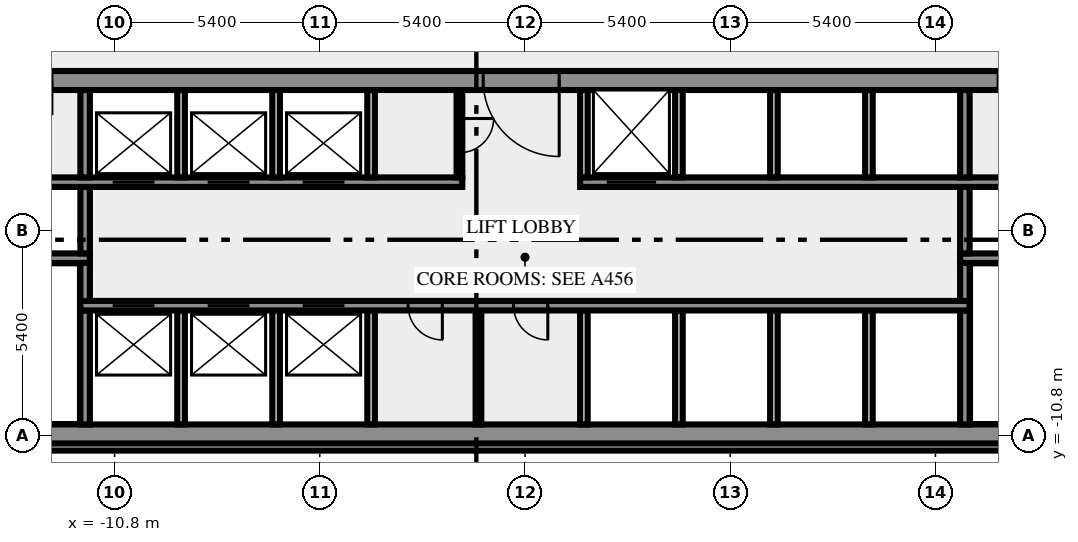
"""IFC4 building model, lengths in metres.
Left out: names, types, materials, properties, quantities, classifications, styles, units other than length and angle.
Written with IfcOpenShell. Run it as: python <this file> out.ifc"""

import sys

from ifc_helpers import new_model, si_unit, direction, frame, frame_2d, origin, place, context, subcontext, project, spatial, rectangle, extrude, element, fill, save


model = new_model("IFC4")
c1 = context("Model", 3, precision=1e-05, world=origin(), true_north=direction((0.0, 1.0)))
c2 = subcontext(c1, "Body", "Model", "MODEL_VIEW")
j1 = project(units=[si_unit("LENGTHUNIT", "METRE"), si_unit("PLANEANGLEUNIT", "RADIAN")], contexts=[c1])
p1 = place(None, origin())
s1 = spatial("IfcSite", under=j1, at=p1, CompositionType="ELEMENT")
p2 = place(p1, origin())
s2 = spatial("IfcBuilding", under=s1, at=p2, CompositionType="ELEMENT")
p3 = place(p2, frame((0.0, 0.0, 51.0)))
s3 = spatial("IfcBuildingStorey", under=s2, at=p3, CompositionType="ELEMENT", Elevation=51.0)
p4 = place(p3, frame((-17.444, -11.088, 0.0), z_axis=(0.0, 0.0, 1.0), x_axis=(1.0, 0.0, 0.0)))
e1 = element("IfcWall", 1, at=p4, inside=s3, PredefinedType="SOLIDWALL", context=c2, shape_type="SweptSolid", body=[
    extrude(rectangle(XDim=34.888, YDim=0.2, at=frame_2d((17.444, 0.0))), origin(), (0.0, 0.0, 1.0), 3.65),
])
p5 = place(p3, frame((-20.0, -10.75, 0.0), z_axis=(0.0, 0.0, 1.0), x_axis=(1.0, 0.0, 0.0)))
e2 = element("IfcWall", 2, at=p5, inside=s3, PredefinedType="SHEAR", context=c2, shape_type="SweptSolid", body=[
    extrude(rectangle(XDim=40.0, YDim=0.5, at=frame_2d((20.0, 0.0))), origin(), (0.0, 0.0, 1.0), 3.65),
])
p6 = place(p5, frame((0.8, 0.0, 1.0)))
e3 = element("IfcOpeningElement", 3, at=p6, cuts=e2, PredefinedType="OPENING", context=c2, shape_type="SweptSolid", body=[
    extrude(rectangle(XDim=1.2, YDim=1.2, at=frame_2d((0.6, 0.6))), frame((0.0, 0.26, 0.0), z_axis=(0.0, -1.0, 0.0), x_axis=(1.0, 0.0, 0.0)), (0.0, 0.0, 1.0), 0.52),
])
p7 = place(p5, frame((38.0, 0.0, 1.0)))
e4 = element("IfcOpeningElement", 4, at=p7, cuts=e2, PredefinedType="OPENING", context=c2, shape_type="SweptSolid", body=[
    extrude(rectangle(XDim=1.2, YDim=1.2, at=frame_2d((0.6, 0.6))), frame((0.0, 0.26, 0.0), z_axis=(0.0, -1.0, 0.0), x_axis=(1.0, 0.0, 0.0)), (0.0, 0.0, 1.0), 0.52),
])
p8 = place(p3, frame((-11.575, -10.5, 0.0), z_axis=(0.0, 0.0, 1.0), x_axis=(0.0, 1.0, 0.0)))
e5 = element("IfcWall", 5, at=p8, inside=s3, PredefinedType="SHEAR", context=c2, shape_type="SweptSolid", body=[
    extrude(rectangle(XDim=3.0, YDim=0.25, at=frame_2d((1.5, 0.0))), origin(), (0.0, 0.0, 1.0), 3.65),
])
for number, where, z_axis, x_axis in (
    (6, (-9.05, -10.5, 0.0), (0.0, 0.0, 1.0), (0.0, 1.0, 0.0)),
    (7, (-6.55, -10.5, 0.0), (0.0, 0.0, 1.0), (0.0, 1.0, 0.0)),
    (8, (-4.05, -10.5, 0.0), (0.0, 0.0, 1.0), (0.0, 1.0, 0.0)),
):
    element("IfcWall", number, at=place(p3, frame(where, z_axis=z_axis, x_axis=x_axis)), inside=s3, PredefinedType="SOLIDWALL", context=c2, shape_type="SweptSolid", body=[
        extrude(rectangle(XDim=3.0, YDim=0.2, at=frame_2d((1.5, 0.0))), origin(), (0.0, 0.0, 1.0), 3.65),
    ])
p9 = place(p3, frame((-1.225, -10.5, 0.0), z_axis=(0.0, 0.0, 1.0), x_axis=(0.0, 1.0, 0.0)))
e9 = element("IfcWall", 9, at=p9, inside=s3, PredefinedType="PARTITIONING", context=c2, shape_type="SweptSolid", body=[
    extrude(rectangle(XDim=3.0, YDim=0.15, at=frame_2d((1.5, 0.0))), origin(), (0.0, 0.0, 1.0), 3.65),
])
for number, where, z_axis, x_axis in (
    (10, (1.55, -10.5, 0.0), (0.0, 0.0, 1.0), (0.0, 1.0, 0.0)),
    (11, (4.05, -10.5, 0.0), (0.0, 0.0, 1.0), (0.0, 1.0, 0.0)),
    (12, (6.55, -10.5, 0.0), (0.0, 0.0, 1.0), (0.0, 1.0, 0.0)),
    (13, (9.05, -10.5, 0.0), (0.0, 0.0, 1.0), (0.0, 1.0, 0.0)),
):
    element("IfcWall", number, at=place(p3, frame(where, z_axis=z_axis, x_axis=x_axis)), inside=s3, PredefinedType="SOLIDWALL", context=c2, shape_type="SweptSolid", body=[
        extrude(rectangle(XDim=3.0, YDim=0.2, at=frame_2d((1.5, 0.0))), origin(), (0.0, 0.0, 1.0), 3.65),
    ])
p10 = place(p3, frame((11.575, -10.5, 0.0), z_axis=(0.0, 0.0, 1.0), x_axis=(0.0, 1.0, 0.0)))
e14 = element("IfcWall", 14, at=p10, inside=s3, PredefinedType="SHEAR", context=c2, shape_type="SweptSolid", body=[
    extrude(rectangle(XDim=3.0, YDim=0.25, at=frame_2d((1.5, 0.0))), origin(), (0.0, 0.0, 1.0), 3.65),
])
p11 = place(p3, frame((11.7, -7.375, 0.0), z_axis=(0.0, 0.0, 1.0), x_axis=(-1.0, 0.0, 0.0)))
e15 = element("IfcWall", 15, at=p11, inside=s3, PredefinedType="SHEAR", context=c2, shape_type="SweptSolid", body=[
    extrude(rectangle(XDim=23.4, YDim=0.25, at=frame_2d((11.7, 0.0))), origin(), (0.0, 0.0, 1.0), 3.65),
])
p12 = place(p11, frame((21.45, 0.0, 0.0)))
e16 = element("IfcOpeningElement", 16, at=p12, cuts=e15, PredefinedType="OPENING", context=c2, shape_type="SweptSolid", body=[
    extrude(rectangle(XDim=1.1, YDim=2.1, at=frame_2d((0.55, 1.05))), frame((0.0, 0.135, 0.0), z_axis=(0.0, -1.0, 0.0), x_axis=(1.0, 0.0, 0.0)), (0.0, 0.0, 1.0), 0.27),
])
p13 = place(p11, frame((18.95, 0.0, 0.0)))
e17 = element("IfcOpeningElement", 17, at=p13, cuts=e15, PredefinedType="OPENING", context=c2, shape_type="SweptSolid", body=[
    extrude(rectangle(XDim=1.1, YDim=2.1, at=frame_2d((0.55, 1.05))), frame((0.0, 0.135, 0.0), z_axis=(0.0, -1.0, 0.0), x_axis=(1.0, 0.0, 0.0)), (0.0, 0.0, 1.0), 0.27),
])
p14 = place(p11, frame((16.45, 0.0, 0.0)))
e18 = element("IfcOpeningElement", 18, at=p14, cuts=e15, PredefinedType="OPENING", context=c2, shape_type="SweptSolid", body=[
    extrude(rectangle(XDim=1.1, YDim=2.1, at=frame_2d((0.55, 1.05))), frame((0.0, 0.135, 0.0), z_axis=(0.0, -1.0, 0.0), x_axis=(1.0, 0.0, 0.0)), (0.0, 0.0, 1.0), 0.27),
])
p15 = place(p11, frame((13.875, 0.0, 0.0)))
e19 = element("IfcOpeningElement", 19, at=p15, cuts=e15, PredefinedType="OPENING", context=c2, shape_type="SweptSolid", body=[
    extrude(rectangle(XDim=0.9, YDim=2.1, at=frame_2d((0.45, 1.05))), frame((0.0, 0.135, 0.0), z_axis=(0.0, -1.0, 0.0), x_axis=(1.0, 0.0, 0.0)), (0.0, 0.0, 1.0), 0.27),
])
p16 = place(p11, frame((11.1, 0.0, 0.0)))
e20 = element("IfcOpeningElement", 20, at=p16, cuts=e15, PredefinedType="OPENING", context=c2, shape_type="SweptSolid", body=[
    extrude(rectangle(XDim=0.9, YDim=2.1, at=frame_2d((0.45, 1.05))), frame((0.0, 0.135, 0.0), z_axis=(0.0, -1.0, 0.0), x_axis=(1.0, 0.0, 0.0)), (0.0, 0.0, 1.0), 0.27),
])
for number, where, z_axis, x_axis in (
    (21, (-11.575, -7.25, 0.0), (0.0, 0.0, 1.0), (0.0, 1.0, 0.0)),
    (22, (11.575, -7.25, 0.0), (0.0, 0.0, 1.0), (0.0, 1.0, 0.0)),
):
    element("IfcWall", number, at=place(p3, frame(where, z_axis=z_axis, x_axis=x_axis)), inside=s3, PredefinedType="SHEAR", context=c2, shape_type="SweptSolid", body=[
        extrude(rectangle(XDim=1.0, YDim=0.25, at=frame_2d((0.5, 0.0))), origin(), (0.0, 0.0, 1.0), 3.65),
    ])
p17 = place(p3, frame((-11.45, -6.125, 0.0), z_axis=(0.0, 0.0, 1.0), x_axis=(-1.0, 0.0, 0.0)))
e23 = element("IfcWall", 23, at=p17, inside=s3, PredefinedType="SHEAR", context=c2, shape_type="SweptSolid", body=[
    extrude(rectangle(XDim=8.05, YDim=0.25, at=frame_2d((4.025, 0.0))), origin(), (0.0, 0.0, 1.0), 3.65),
])
p18 = place(p17, frame((6.2, 0.0, 0.0)))
e24 = element("IfcOpeningElement", 24, at=p18, cuts=e23, PredefinedType="OPENING", context=c2, shape_type="SweptSolid", body=[
    extrude(rectangle(XDim=1.8, YDim=2.1, at=frame_2d((0.9, 1.05))), frame((0.0, 0.135, 0.0), z_axis=(0.0, -1.0, 0.0), x_axis=(1.0, 0.0, 0.0)), (0.0, 0.0, 1.0), 0.27),
])
p19 = place(p3, frame((19.5, -6.125, 0.0), z_axis=(0.0, 0.0, 1.0), x_axis=(-1.0, 0.0, 0.0)))
e25 = element("IfcWall", 25, at=p19, inside=s3, PredefinedType="SHEAR", context=c2, shape_type="SweptSolid", body=[
    extrude(rectangle(XDim=8.05, YDim=0.25, at=frame_2d((4.025, 0.0))), origin(), (0.0, 0.0, 1.0), 3.65),
])
p20 = place(p19, frame((0.05, 0.0, 0.0)))
e26 = element("IfcOpeningElement", 26, at=p20, cuts=e25, PredefinedType="OPENING", context=c2, shape_type="SweptSolid", body=[
    extrude(rectangle(XDim=1.8, YDim=2.1, at=frame_2d((0.9, 1.05))), frame((0.0, 0.135, 0.0), z_axis=(0.0, -1.0, 0.0), x_axis=(1.0, 0.0, 0.0)), (0.0, 0.0, 1.0), 0.27),
])
for number, where, z_axis, x_axis in (
    (27, (-11.575, -6.0, 0.0), (0.0, 0.0, 1.0), (0.0, 1.0, 0.0)),
    (28, (11.575, -6.0, 0.0), (0.0, 0.0, 1.0), (0.0, 1.0, 0.0)),
):
    element("IfcWall", number, at=place(p3, frame(where, z_axis=z_axis, x_axis=x_axis)), inside=s3, PredefinedType="SHEAR", context=c2, shape_type="SweptSolid", body=[
        extrude(rectangle(XDim=1.75, YDim=0.25, at=frame_2d((0.875, 0.0))), origin(), (0.0, 0.0, 1.0), 3.65),
    ])
p21 = place(p3, frame((-14.35, -4.125, 0.0), z_axis=(0.0, 0.0, 1.0), x_axis=(1.0, 0.0, 0.0)))
e29 = element("IfcWall", 29, at=p21, inside=s3, PredefinedType="SHEAR", context=c2, shape_type="SweptSolid", body=[
    extrude(rectangle(XDim=12.7, YDim=0.25, at=frame_2d((6.35, 0.0))), origin(), (0.0, 0.0, 1.0), 3.65),
])
p22 = place(p21, frame((3.5, 0.0, 0.0)))
e30 = element("IfcOpeningElement", 30, at=p22, cuts=e29, PredefinedType="OPENING", context=c2, shape_type="SweptSolid", body=[
    extrude(rectangle(XDim=1.1, YDim=2.1, at=frame_2d((0.55, 1.05))), frame((0.0, 0.135, 0.0), z_axis=(0.0, -1.0, 0.0), x_axis=(1.0, 0.0, 0.0)), (0.0, 0.0, 1.0), 0.27),
])
p23 = place(p21, frame((6.0, 0.0, 0.0)))
e31 = element("IfcOpeningElement", 31, at=p23, cuts=e29, PredefinedType="OPENING", context=c2, shape_type="SweptSolid", body=[
    extrude(rectangle(XDim=1.1, YDim=2.1, at=frame_2d((0.55, 1.05))), frame((0.0, 0.135, 0.0), z_axis=(0.0, -1.0, 0.0), x_axis=(1.0, 0.0, 0.0)), (0.0, 0.0, 1.0), 0.27),
])
p24 = place(p21, frame((8.5, 0.0, 0.0)))
e32 = element("IfcOpeningElement", 32, at=p24, cuts=e29, PredefinedType="OPENING", context=c2, shape_type="SweptSolid", body=[
    extrude(rectangle(XDim=1.1, YDim=2.1, at=frame_2d((0.55, 1.05))), frame((0.0, 0.135, 0.0), z_axis=(0.0, -1.0, 0.0), x_axis=(1.0, 0.0, 0.0)), (0.0, 0.0, 1.0), 0.27),
])
p25 = place(p3, frame((1.45, -4.125, 0.0), z_axis=(0.0, 0.0, 1.0), x_axis=(1.0, 0.0, 0.0)))
e33 = element("IfcWall", 33, at=p25, inside=s3, PredefinedType="SHEAR", context=c2, shape_type="SweptSolid", body=[
    extrude(rectangle(XDim=12.9, YDim=0.25, at=frame_2d((6.45, 0.0))), origin(), (0.0, 0.0, 1.0), 3.65),
])
p26 = place(p25, frame((0.7, 0.0, 0.0)))
e34 = element("IfcOpeningElement", 34, at=p26, cuts=e33, PredefinedType="OPENING", context=c2, shape_type="SweptSolid", body=[
    extrude(rectangle(XDim=1.3, YDim=2.1, at=frame_2d((0.65, 1.05))), frame((0.0, 0.135, 0.0), z_axis=(0.0, -1.0, 0.0), x_axis=(1.0, 0.0, 0.0)), (0.0, 0.0, 1.0), 0.27),
])
p27 = place(p3, frame((-11.575, -4.0, 0.0), z_axis=(0.0, 0.0, 1.0), x_axis=(0.0, 1.0, 0.0)))
e35 = element("IfcWall", 35, at=p27, inside=s3, PredefinedType="SHEAR", context=c2, shape_type="SweptSolid", body=[
    extrude(rectangle(XDim=2.3, YDim=0.25, at=frame_2d((1.15, 0.0))), origin(), (0.0, 0.0, 1.0), 3.65),
])
for number, where, z_axis, x_axis in (
    (36, (-9.05, -4.0, 0.0), (0.0, 0.0, 1.0), (0.0, 1.0, 0.0)),
    (37, (-6.55, -4.0, 0.0), (0.0, 0.0, 1.0), (0.0, 1.0, 0.0)),
    (38, (-4.05, -4.0, 0.0), (0.0, 0.0, 1.0), (0.0, 1.0, 0.0)),
):
    element("IfcWall", number, at=place(p3, frame(where, z_axis=z_axis, x_axis=x_axis)), inside=s3, PredefinedType="SOLIDWALL", context=c2, shape_type="SweptSolid", body=[
        extrude(rectangle(XDim=2.3, YDim=0.2, at=frame_2d((1.15, 0.0))), origin(), (0.0, 0.0, 1.0), 3.65),
    ])
p28 = place(p3, frame((-1.725, -1.7, 0.0), z_axis=(0.0, 0.0, 1.0), x_axis=(0.0, -1.0, 0.0)))
e39 = element("IfcWall", 39, at=p28, inside=s3, PredefinedType="PARTITIONING", context=c2, shape_type="SweptSolid", body=[
    extrude(rectangle(XDim=2.3, YDim=0.15, at=frame_2d((1.15, 0.0))), origin(), (0.0, 0.0, 1.0), 3.65),
])
p29 = place(p28, frame((0.75, 0.0, 0.0)))
e40 = element("IfcOpeningElement", 40, at=p29, cuts=e39, PredefinedType="OPENING", context=c2, shape_type="SweptSolid", body=[
    extrude(rectangle(XDim=0.9, YDim=2.1, at=frame_2d((0.45, 1.05))), frame((0.0, 0.085, 0.0), z_axis=(0.0, -1.0, 0.0), x_axis=(1.0, 0.0, 0.0)), (0.0, 0.0, 1.0), 0.17),
])
for number, where, z_axis, x_axis in (
    (41, (1.55, -4.0, 0.0), (0.0, 0.0, 1.0), (0.0, 1.0, 0.0)),
    (42, (4.05, -4.0, 0.0), (0.0, 0.0, 1.0), (0.0, 1.0, 0.0)),
    (43, (6.55, -4.0, 0.0), (0.0, 0.0, 1.0), (0.0, 1.0, 0.0)),
    (44, (9.05, -4.0, 0.0), (0.0, 0.0, 1.0), (0.0, 1.0, 0.0)),
):
    element("IfcWall", number, at=place(p3, frame(where, z_axis=z_axis, x_axis=x_axis)), inside=s3, PredefinedType="SOLIDWALL", context=c2, shape_type="SweptSolid", body=[
        extrude(rectangle(XDim=2.3, YDim=0.2, at=frame_2d((1.15, 0.0))), origin(), (0.0, 0.0, 1.0), 3.65),
    ])
p30 = place(p3, frame((11.575, -4.0, 0.0), z_axis=(0.0, 0.0, 1.0), x_axis=(0.0, 1.0, 0.0)))
e45 = element("IfcWall", 45, at=p30, inside=s3, PredefinedType="SHEAR", context=c2, shape_type="SweptSolid", body=[
    extrude(rectangle(XDim=2.3, YDim=0.25, at=frame_2d((1.15, 0.0))), origin(), (0.0, 0.0, 1.0), 3.65),
])
p31 = place(p3, frame((20.49, -1.45, 0.0), z_axis=(0.0, 0.0, 1.0), x_axis=(-1.0, 0.0, 0.0)))
e46 = element("IfcWall", 46, at=p31, inside=s3, PredefinedType="SHEAR", context=c2, shape_type="SweptSolid", body=[
    extrude(rectangle(XDim=40.98, YDim=0.5, at=frame_2d((20.49, 0.0))), origin(), (0.0, 0.0, 1.0), 3.65),
])
p32 = place(p31, frame((38.14, 0.0, 0.0)))
e47 = element("IfcOpeningElement", 47, at=p32, cuts=e46, PredefinedType="OPENING", context=c2, shape_type="SweptSolid", body=[
    extrude(rectangle(XDim=1.8, YDim=2.1, at=frame_2d((0.9, 1.05))), frame((0.0, 0.26, 0.0), z_axis=(0.0, -1.0, 0.0), x_axis=(1.0, 0.0, 0.0)), (0.0, 0.0, 1.0), 0.52),
])
p33 = place(p31, frame((35.89, 0.0, 0.0)))
e48 = element("IfcOpeningElement", 48, at=p33, cuts=e46, PredefinedType="OPENING", context=c2, shape_type="SweptSolid", body=[
    extrude(rectangle(XDim=0.9, YDim=2.1, at=frame_2d((0.45, 1.05))), frame((0.0, 0.26, 0.0), z_axis=(0.0, -1.0, 0.0), x_axis=(1.0, 0.0, 0.0)), (0.0, 0.0, 1.0), 0.52),
])
p34 = place(p31, frame((32.94, 0.0, 0.0)))
e49 = element("IfcOpeningElement", 49, at=p34, cuts=e46, PredefinedType="OPENING", context=c2, shape_type="SweptSolid", body=[
    extrude(rectangle(XDim=0.9, YDim=2.1, at=frame_2d((0.45, 1.05))), frame((0.0, 0.26, 0.0), z_axis=(0.0, -1.0, 0.0), x_axis=(1.0, 0.0, 0.0)), (0.0, 0.0, 1.0), 0.52),
])
p35 = place(p31, frame((19.59, 0.0, 0.0)))
e50 = element("IfcOpeningElement", 50, at=p35, cuts=e46, PredefinedType="OPENING", context=c2, shape_type="SweptSolid", body=[
    extrude(rectangle(XDim=2.0, YDim=2.1, at=frame_2d((1.0, 1.05))), frame((0.0, 0.26, 0.0), z_axis=(0.0, -1.0, 0.0), x_axis=(1.0, 0.0, 0.0)), (0.0, 0.0, 1.0), 0.52),
])
p36 = place(p31, frame((7.14, 0.0, 0.0)))
e51 = element("IfcOpeningElement", 51, at=p36, cuts=e46, PredefinedType="OPENING", context=c2, shape_type="SweptSolid", body=[
    extrude(rectangle(XDim=0.9, YDim=2.1, at=frame_2d((0.45, 1.05))), frame((0.0, 0.26, 0.0), z_axis=(0.0, -1.0, 0.0), x_axis=(1.0, 0.0, 0.0)), (0.0, 0.0, 1.0), 0.52),
])
p37 = place(p31, frame((5.028, 0.0, 0.0)))
e52 = element("IfcOpeningElement", 52, at=p37, cuts=e46, PredefinedType="OPENING", context=c2, shape_type="SweptSolid", body=[
    extrude(rectangle(XDim=0.8, YDim=2.1, at=frame_2d((0.4, 1.05))), frame((0.0, 0.26, 0.0), z_axis=(0.0, -1.0, 0.0), x_axis=(1.0, 0.0, 0.0)), (0.0, 0.0, 1.0), 0.52),
])
p38 = place(p31, frame((3.452, 0.0, 0.0)))
e53 = element("IfcOpeningElement", 53, at=p38, cuts=e46, PredefinedType="OPENING", context=c2, shape_type="SweptSolid", body=[
    extrude(rectangle(XDim=0.8, YDim=2.1, at=frame_2d((0.4, 1.05))), frame((0.0, 0.26, 0.0), z_axis=(0.0, -1.0, 0.0), x_axis=(1.0, 0.0, 0.0)), (0.0, 0.0, 1.0), 0.52),
])
p39 = place(p31, frame((1.04, 0.0, 0.0)))
e54 = element("IfcOpeningElement", 54, at=p39, cuts=e46, PredefinedType="OPENING", context=c2, shape_type="SweptSolid", body=[
    extrude(rectangle(XDim=1.8, YDim=2.1, at=frame_2d((0.9, 1.05))), frame((0.0, 0.26, 0.0), z_axis=(0.0, -1.0, 0.0), x_axis=(1.0, 0.0, 0.0)), (0.0, 0.0, 1.0), 0.52),
])
p40 = place(p12, origin())
e55 = element("IfcDoor", 55, at=p40, inside=s3, OperationType="DOUBLE_DOOR_SLIDING", PredefinedType="DOOR", context=c2, shape_type="SweptSolid", body=[
    extrude(rectangle(XDim=1.1, YDim=2.1, at=frame_2d((0.55, 1.05))), frame((0.0, 0.025, 0.0), z_axis=(0.0, -1.0, 0.0), x_axis=(1.0, 0.0, 0.0)), (0.0, 0.0, 1.0), 0.05),
])
fill(e16, e55)
p41 = place(p13, origin())
e56 = element("IfcDoor", 56, at=p41, inside=s3, OperationType="DOUBLE_DOOR_SLIDING", PredefinedType="DOOR", context=c2, shape_type="SweptSolid", body=[
    extrude(rectangle(XDim=1.1, YDim=2.1, at=frame_2d((0.55, 1.05))), frame((0.0, 0.025, 0.0), z_axis=(0.0, -1.0, 0.0), x_axis=(1.0, 0.0, 0.0)), (0.0, 0.0, 1.0), 0.05),
])
fill(e17, e56)
p42 = place(p14, origin())
e57 = element("IfcDoor", 57, at=p42, inside=s3, OperationType="DOUBLE_DOOR_SLIDING", PredefinedType="DOOR", context=c2, shape_type="SweptSolid", body=[
    extrude(rectangle(XDim=1.1, YDim=2.1, at=frame_2d((0.55, 1.05))), frame((0.0, 0.025, 0.0), z_axis=(0.0, -1.0, 0.0), x_axis=(1.0, 0.0, 0.0)), (0.0, 0.0, 1.0), 0.05),
])
fill(e18, e57)
p43 = place(p15, origin())
e58 = element("IfcDoor", 58, at=p43, inside=s3, OperationType="SINGLE_SWING_RIGHT", PredefinedType="DOOR", context=c2, shape_type="SweptSolid", body=[
    extrude(rectangle(XDim=0.9, YDim=2.1, at=frame_2d((0.45, 1.05))), frame((0.0, 0.025, 0.0), z_axis=(0.0, -1.0, 0.0), x_axis=(1.0, 0.0, 0.0)), (0.0, 0.0, 1.0), 0.05),
])
fill(e19, e58)
p44 = place(p16, origin())
e59 = element("IfcDoor", 59, at=p44, inside=s3, OperationType="SINGLE_SWING_LEFT", PredefinedType="DOOR", context=c2, shape_type="SweptSolid", body=[
    extrude(rectangle(XDim=0.9, YDim=2.1, at=frame_2d((0.45, 1.05))), frame((0.0, 0.025, 0.0), z_axis=(0.0, -1.0, 0.0), x_axis=(1.0, 0.0, 0.0)), (0.0, 0.0, 1.0), 0.05),
])
fill(e20, e59)
p45 = place(p22, origin())
e60 = element("IfcDoor", 60, at=p45, inside=s3, OperationType="DOUBLE_DOOR_SLIDING", PredefinedType="DOOR", context=c2, shape_type="SweptSolid", body=[
    extrude(rectangle(XDim=1.1, YDim=2.1, at=frame_2d((0.55, 1.05))), frame((0.0, 0.025, 0.0), z_axis=(0.0, -1.0, 0.0), x_axis=(1.0, 0.0, 0.0)), (0.0, 0.0, 1.0), 0.05),
])
fill(e30, e60)
p46 = place(p23, origin())
e61 = element("IfcDoor", 61, at=p46, inside=s3, OperationType="DOUBLE_DOOR_SLIDING", PredefinedType="DOOR", context=c2, shape_type="SweptSolid", body=[
    extrude(rectangle(XDim=1.1, YDim=2.1, at=frame_2d((0.55, 1.05))), frame((0.0, 0.025, 0.0), z_axis=(0.0, -1.0, 0.0), x_axis=(1.0, 0.0, 0.0)), (0.0, 0.0, 1.0), 0.05),
])
fill(e31, e61)
p47 = place(p24, origin())
e62 = element("IfcDoor", 62, at=p47, inside=s3, OperationType="DOUBLE_DOOR_SLIDING", PredefinedType="DOOR", context=c2, shape_type="SweptSolid", body=[
    extrude(rectangle(XDim=1.1, YDim=2.1, at=frame_2d((0.55, 1.05))), frame((0.0, 0.025, 0.0), z_axis=(0.0, -1.0, 0.0), x_axis=(1.0, 0.0, 0.0)), (0.0, 0.0, 1.0), 0.05),
])
fill(e32, e62)
p48 = place(p26, origin())
e63 = element("IfcDoor", 63, at=p48, inside=s3, OperationType="DOUBLE_DOOR_SLIDING", PredefinedType="DOOR", context=c2, shape_type="SweptSolid", body=[
    extrude(rectangle(XDim=1.3, YDim=2.1, at=frame_2d((0.65, 1.05))), frame((0.0, 0.025, 0.0), z_axis=(0.0, -1.0, 0.0), x_axis=(1.0, 0.0, 0.0)), (0.0, 0.0, 1.0), 0.05),
])
fill(e34, e63)
p49 = place(p29, origin())
e64 = element("IfcDoor", 64, at=p49, inside=s3, OperationType="SINGLE_SWING_RIGHT", PredefinedType="DOOR", context=c2, shape_type="SweptSolid", body=[
    extrude(rectangle(XDim=0.9, YDim=2.1, at=frame_2d((0.45, 1.05))), frame((0.0, 0.025, 0.0), z_axis=(0.0, -1.0, 0.0), x_axis=(1.0, 0.0, 0.0)), (0.0, 0.0, 1.0), 0.05),
])
fill(e40, e64)
p50 = place(p35, origin())
e65 = element("IfcDoor", 65, at=p50, inside=s3, OperationType="DOUBLE_DOOR_SINGLE_SWING", PredefinedType="DOOR", context=c2, shape_type="SweptSolid", body=[
    extrude(rectangle(XDim=2.0, YDim=2.1, at=frame_2d((1.0, 1.05))), frame((0.0, 0.025, 0.0), z_axis=(0.0, -1.0, 0.0), x_axis=(1.0, 0.0, 0.0)), (0.0, 0.0, 1.0), 0.05),
])
fill(e50, e65)
save(model, sys.argv[1])
